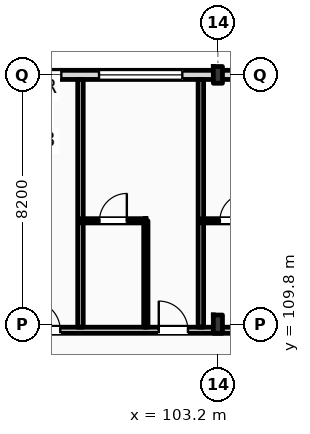
"""IFC4 building model, lengths in metres.
Left out: names, types, materials, properties, quantities, classifications, styles, units other than length and angle.
Written with IfcOpenShell. Run it as: python <this file> out.ifc"""

import sys

from ifc_helpers import new_model, si_unit, direction, frame, frame_2d, origin, origin_2d, place, context, subcontext, project, spatial, rectangle, i_section, extrude, element, fill, save


model = new_model("IFC4")
c1 = context("Model", 3, precision=1e-05, world=origin(), true_north=direction((0.0, 1.0)))
c2 = subcontext(c1, "Body", "Model", "MODEL_VIEW")
j1 = project(units=[si_unit("LENGTHUNIT", "METRE"), si_unit("PLANEANGLEUNIT", "RADIAN")], contexts=[c1])
p1 = place(None, origin())
s1 = spatial("IfcSite", under=j1, at=p1, CompositionType="ELEMENT")
p2 = place(p1, origin())
s2 = spatial("IfcBuilding", under=s1, at=p2, CompositionType="ELEMENT")
p3 = place(p2, frame((0.0, 0.0, 20.4)))
s3 = spatial("IfcBuildingStorey", under=s2, at=p3, CompositionType="ELEMENT", Elevation=20.4)
p4 = place(p3, frame((103.2, 109.8, 0.0), z_axis=(0.0, 0.0, 1.0), x_axis=(1.0, 0.0, 0.0)))
e1 = element("IfcColumn", 1, at=p4, inside=s3, PredefinedType="COLUMN", context=c2, shape_type="SweptSolid", body=[
    extrude(i_section(OverallWidth=0.3, OverallDepth=0.6, WebThickness=0.015, FlangeThickness=0.03, FilletRadius=0.027, at=origin_2d()), origin(), (0.0, 0.0, 1.0), 4.2),
])
p5 = place(p3, frame((103.2, 118.0, 0.0), z_axis=(0.0, 0.0, 1.0), x_axis=(1.0, 0.0, 0.0)))
e2 = element("IfcColumn", 2, at=p5, inside=s3, PredefinedType="COLUMN", context=c2, shape_type="SweptSolid", body=[
    extrude(i_section(OverallWidth=0.3, OverallDepth=0.55, WebThickness=0.015, FlangeThickness=0.029, FilletRadius=0.027, at=origin_2d()), origin(), (0.0, 0.0, 1.0), 4.2),
])
p6 = place(p3, frame((22.5, 118.0, 0.0), z_axis=(0.0, 0.0, 1.0), x_axis=(1.0, 0.0, 0.0)))
e3 = element("IfcWall", 3, at=p6, inside=s3, PredefinedType="STANDARD", context=c2, shape_type="SweptSolid", body=[
    extrude(rectangle(XDim=97.5, YDim=0.3, at=frame_2d((48.75, 0.0))), origin(), (0.0, 0.0, 1.0), 3.38),
])
p7 = place(p6, frame((0.91, 0.0, 0.9)))
e4 = element("IfcOpeningElement", 4, at=p7, cuts=e3, PredefinedType="OPENING", context=c2, shape_type="SweptSolid", body=[
    extrude(rectangle(XDim=0.9, YDim=1.8, at=frame_2d((0.45, 0.9))), frame((0.0, 0.16, 0.0), z_axis=(0.0, -1.0, 0.0), x_axis=(1.0, 0.0, 0.0)), (0.0, 0.0, 1.0), 0.32),
])
p8 = place(p6, frame((6.36, 0.0, 0.0)))
e5 = element("IfcOpeningElement", 5, at=p8, cuts=e3, PredefinedType="OPENING", context=c2, shape_type="SweptSolid", body=[
    extrude(rectangle(XDim=1.2, YDim=2.25, at=frame_2d((0.6, 1.125))), frame((0.0, 0.16, 0.0), z_axis=(0.0, -1.0, 0.0), x_axis=(1.0, 0.0, 0.0)), (0.0, 0.0, 1.0), 0.32),
])
p9 = place(p6, frame((11.41, 0.0, 0.9)))
e6 = element("IfcOpeningElement", 6, at=p9, cuts=e3, PredefinedType="OPENING", context=c2, shape_type="SweptSolid", body=[
    extrude(rectangle(XDim=1.1, YDim=1.9, at=frame_2d((0.55, 0.95))), frame((0.0, 0.16, 0.0), z_axis=(0.0, -1.0, 0.0), x_axis=(1.0, 0.0, 0.0)), (0.0, 0.0, 1.0), 0.32),
])
p10 = place(p6, frame((14.335, 0.0, 0.9)))
e7 = element("IfcOpeningElement", 7, at=p10, cuts=e3, PredefinedType="OPENING", context=c2, shape_type="SweptSolid", body=[
    extrude(rectangle(XDim=1.65, YDim=1.95, at=frame_2d((0.825, 0.975))), frame((0.0, 0.16, 0.0), z_axis=(0.0, -1.0, 0.0), x_axis=(1.0, 0.0, 0.0)), (0.0, 0.0, 1.0), 0.32),
])
p11 = place(p6, frame((19.26, 0.0, 0.9)))
e8 = element("IfcOpeningElement", 8, at=p11, cuts=e3, PredefinedType="OPENING", context=c2, shape_type="SweptSolid", body=[
    extrude(rectangle(XDim=1.35, YDim=2.0, at=frame_2d((0.675, 1.0))), frame((0.0, 0.16, 0.0), z_axis=(0.0, -1.0, 0.0), x_axis=(1.0, 0.0, 0.0)), (0.0, 0.0, 1.0), 0.32),
])
p12 = place(p6, frame((22.8, 0.0, 0.0)))
e9 = element("IfcOpeningElement", 9, at=p12, cuts=e3, PredefinedType="OPENING", context=c2, shape_type="SweptSolid", body=[
    extrude(rectangle(XDim=1.2, YDim=2.25, at=frame_2d((0.6, 1.125))), frame((0.0, 0.16, 0.0), z_axis=(0.0, -1.0, 0.0), x_axis=(1.0, 0.0, 0.0)), (0.0, 0.0, 1.0), 0.32),
])
p13 = place(p6, frame((26.91, 0.0, 0.9)))
e10 = element("IfcOpeningElement", 10, at=p13, cuts=e3, PredefinedType="OPENING", context=c2, shape_type="SweptSolid", body=[
    extrude(rectangle(XDim=2.1, YDim=2.1, at=frame_2d((1.05, 1.05))), frame((0.0, 0.16, 0.0), z_axis=(0.0, -1.0, 0.0), x_axis=(1.0, 0.0, 0.0)), (0.0, 0.0, 1.0), 0.32),
])
p14 = place(p6, frame((30.835, 0.0, 0.9)))
e11 = element("IfcOpeningElement", 11, at=p14, cuts=e3, PredefinedType="OPENING", context=c2, shape_type="SweptSolid", body=[
    extrude(rectangle(XDim=2.25, YDim=2.15, at=frame_2d((1.125, 1.075))), frame((0.0, 0.16, 0.0), z_axis=(0.0, -1.0, 0.0), x_axis=(1.0, 0.0, 0.0)), (0.0, 0.0, 1.0), 0.32),
])
p15 = place(p6, frame((34.96, 0.0, 0.9)))
e12 = element("IfcOpeningElement", 12, at=p15, cuts=e3, PredefinedType="OPENING", context=c2, shape_type="SweptSolid", body=[
    extrude(rectangle(XDim=2.4, YDim=2.2, at=frame_2d((1.2, 1.1))), frame((0.0, 0.16, 0.0), z_axis=(0.0, -1.0, 0.0), x_axis=(1.0, 0.0, 0.0)), (0.0, 0.0, 1.0), 0.32),
])
p16 = place(p6, frame((39.0, 0.0, 0.0)))
e13 = element("IfcOpeningElement", 13, at=p16, cuts=e3, PredefinedType="OPENING", context=c2, shape_type="SweptSolid", body=[
    extrude(rectangle(XDim=1.2, YDim=2.25, at=frame_2d((0.6, 1.125))), frame((0.0, 0.16, 0.0), z_axis=(0.0, -1.0, 0.0), x_axis=(1.0, 0.0, 0.0)), (0.0, 0.0, 1.0), 0.32),
])
p17 = place(p6, frame((43.21, 0.0, 0.9)))
e14 = element("IfcOpeningElement", 14, at=p17, cuts=e3, PredefinedType="OPENING", context=c2, shape_type="SweptSolid", body=[
    extrude(rectangle(XDim=2.7, YDim=2.3, at=frame_2d((1.35, 1.15))), frame((0.0, 0.16, 0.0), z_axis=(0.0, -1.0, 0.0), x_axis=(1.0, 0.0, 0.0)), (0.0, 0.0, 1.0), 0.32),
])
p18 = place(p6, frame((47.335, 0.0, 0.9)))
e15 = element("IfcOpeningElement", 15, at=p18, cuts=e3, PredefinedType="OPENING", context=c2, shape_type="SweptSolid", body=[
    extrude(rectangle(XDim=1.35, YDim=2.3, at=frame_2d((0.675, 1.15))), frame((0.0, 0.16, 0.0), z_axis=(0.0, -1.0, 0.0), x_axis=(1.0, 0.0, 0.0)), (0.0, 0.0, 1.0), 0.32),
])
p19 = place(p6, frame((52.74, 0.0, 0.0)))
e16 = element("IfcOpeningElement", 16, at=p19, cuts=e3, PredefinedType="OPENING", context=c2, shape_type="SweptSolid", body=[
    extrude(rectangle(XDim=1.2, YDim=2.25, at=frame_2d((0.6, 1.125))), frame((0.0, 0.16, 0.0), z_axis=(0.0, -1.0, 0.0), x_axis=(1.0, 0.0, 0.0)), (0.0, 0.0, 1.0), 0.32),
])
p20 = place(p6, frame((55.36, 0.0, 0.9)))
e17 = element("IfcOpeningElement", 17, at=p20, cuts=e3, PredefinedType="OPENING", context=c2, shape_type="SweptSolid", body=[
    extrude(rectangle(XDim=1.1, YDim=2.3, at=frame_2d((0.55, 1.15))), frame((0.0, 0.16, 0.0), z_axis=(0.0, -1.0, 0.0), x_axis=(1.0, 0.0, 0.0)), (0.0, 0.0, 1.0), 0.32),
])
p21 = place(p6, frame((59.99, 0.0, 0.9)))
e18 = element("IfcOpeningElement", 18, at=p21, cuts=e3, PredefinedType="OPENING", context=c2, shape_type="SweptSolid", body=[
    extrude(rectangle(XDim=2.74, YDim=2.3, at=frame_2d((1.37, 1.15))), frame((0.0, 0.16, 0.0), z_axis=(0.0, -1.0, 0.0), x_axis=(1.0, 0.0, 0.0)), (0.0, 0.0, 1.0), 0.32),
])
p22 = place(p6, frame((65.95, 0.0, 0.9)))
e19 = element("IfcOpeningElement", 19, at=p22, cuts=e3, PredefinedType="OPENING", context=c2, shape_type="SweptSolid", body=[
    extrude(rectangle(XDim=1.35, YDim=2.3, at=frame_2d((0.675, 1.15))), frame((0.0, 0.16, 0.0), z_axis=(0.0, -1.0, 0.0), x_axis=(1.0, 0.0, 0.0)), (0.0, 0.0, 1.0), 0.32),
])
p23 = place(p6, frame((69.16, 0.0, 0.0)))
e20 = element("IfcOpeningElement", 20, at=p23, cuts=e3, PredefinedType="OPENING", context=c2, shape_type="SweptSolid", body=[
    extrude(rectangle(XDim=1.2, YDim=2.25, at=frame_2d((0.6, 1.125))), frame((0.0, 0.16, 0.0), z_axis=(0.0, -1.0, 0.0), x_axis=(1.0, 0.0, 0.0)), (0.0, 0.0, 1.0), 0.32),
])
p24 = place(p6, frame((73.75, 0.0, 0.9)))
e21 = element("IfcOpeningElement", 21, at=p24, cuts=e3, PredefinedType="OPENING", context=c2, shape_type="SweptSolid", body=[
    extrude(rectangle(XDim=1.8, YDim=2.3, at=frame_2d((0.9, 1.15))), frame((0.0, 0.16, 0.0), z_axis=(0.0, -1.0, 0.0), x_axis=(1.0, 0.0, 0.0)), (0.0, 0.0, 1.0), 0.32),
])
p25 = place(p6, frame((76.79, 0.0, 0.9)))
e22 = element("IfcOpeningElement", 22, at=p25, cuts=e3, PredefinedType="OPENING", context=c2, shape_type="SweptSolid", body=[
    extrude(rectangle(XDim=2.74, YDim=2.3, at=frame_2d((1.37, 1.15))), frame((0.0, 0.16, 0.0), z_axis=(0.0, -1.0, 0.0), x_axis=(1.0, 0.0, 0.0)), (0.0, 0.0, 1.0), 0.32),
])
p26 = place(p6, frame((81.55, 0.0, 0.9)))
e23 = element("IfcOpeningElement", 23, at=p26, cuts=e3, PredefinedType="OPENING", context=c2, shape_type="SweptSolid", body=[
    extrude(rectangle(XDim=1.8, YDim=2.3, at=frame_2d((0.9, 1.15))), frame((0.0, 0.16, 0.0), z_axis=(0.0, -1.0, 0.0), x_axis=(1.0, 0.0, 0.0)), (0.0, 0.0, 1.0), 0.32),
])
p27 = place(p6, frame((86.01, 0.0, 0.9)))
e24 = element("IfcOpeningElement", 24, at=p27, cuts=e3, PredefinedType="OPENING", context=c2, shape_type="SweptSolid", body=[
    extrude(rectangle(XDim=1.1, YDim=1.5, at=frame_2d((0.55, 0.75))), frame((0.0, 0.16, 0.0), z_axis=(0.0, -1.0, 0.0), x_axis=(1.0, 0.0, 0.0)), (0.0, 0.0, 1.0), 0.32),
])
p28 = place(p6, frame((90.135, 0.0, 0.9)))
e25 = element("IfcOpeningElement", 25, at=p28, cuts=e3, PredefinedType="OPENING", context=c2, shape_type="SweptSolid", body=[
    extrude(rectangle(XDim=1.25, YDim=1.6, at=frame_2d((0.625, 0.8))), frame((0.0, 0.16, 0.0), z_axis=(0.0, -1.0, 0.0), x_axis=(1.0, 0.0, 0.0)), (0.0, 0.0, 1.0), 0.32),
])
p29 = place(p6, frame((94.34, 0.0, 0.9)))
e26 = element("IfcOpeningElement", 26, at=p29, cuts=e3, PredefinedType="OPENING", context=c2, shape_type="SweptSolid", body=[
    extrude(rectangle(XDim=1.4, YDim=1.7, at=frame_2d((0.7, 0.85))), frame((0.0, 0.16, 0.0), z_axis=(0.0, -1.0, 0.0), x_axis=(1.0, 0.0, 0.0)), (0.0, 0.0, 1.0), 0.32),
])
p30 = place(p3, frame((10.65, 109.6, 0.0), z_axis=(0.0, 0.0, 1.0), x_axis=(1.0, 0.0, 0.0)))
e27 = element("IfcWall", 27, at=p30, inside=s3, PredefinedType="PARTITIONING", context=c2, shape_type="SweptSolid", body=[
    extrude(rectangle(XDim=109.21, YDim=0.2, at=frame_2d((54.605, 0.0))), origin(), (0.0, 0.0, 1.0), 3.38),
])
p31 = place(p30, frame((12.535, 0.0, 0.0)))
e28 = element("IfcOpeningElement", 28, at=p31, cuts=e27, PredefinedType="OPENING", context=c2, shape_type="SweptSolid", body=[
    extrude(rectangle(XDim=1.02, YDim=2.2, at=frame_2d((0.51, 1.1))), frame((0.0, 0.11, 0.0), z_axis=(0.0, -1.0, 0.0), x_axis=(1.0, 0.0, 0.0)), (0.0, 0.0, 1.0), 0.22),
])
p32 = place(p30, frame((19.175, 0.0, 0.0)))
e29 = element("IfcOpeningElement", 29, at=p32, cuts=e27, PredefinedType="OPENING", context=c2, shape_type="SweptSolid", body=[
    extrude(rectangle(XDim=1.02, YDim=2.2, at=frame_2d((0.51, 1.1))), frame((0.0, 0.11, 0.0), z_axis=(0.0, -1.0, 0.0), x_axis=(1.0, 0.0, 0.0)), (0.0, 0.0, 1.0), 0.22),
])
p33 = place(p30, frame((23.375, 0.0, 0.0)))
e30 = element("IfcOpeningElement", 30, at=p33, cuts=e27, PredefinedType="OPENING", context=c2, shape_type="SweptSolid", body=[
    extrude(rectangle(XDim=1.02, YDim=2.2, at=frame_2d((0.51, 1.1))), frame((0.0, 0.11, 0.0), z_axis=(0.0, -1.0, 0.0), x_axis=(1.0, 0.0, 0.0)), (0.0, 0.0, 1.0), 0.22),
])
p34 = place(p30, frame((27.575, 0.0, 0.0)))
e31 = element("IfcOpeningElement", 31, at=p34, cuts=e27, PredefinedType="OPENING", context=c2, shape_type="SweptSolid", body=[
    extrude(rectangle(XDim=1.02, YDim=2.2, at=frame_2d((0.51, 1.1))), frame((0.0, 0.11, 0.0), z_axis=(0.0, -1.0, 0.0), x_axis=(1.0, 0.0, 0.0)), (0.0, 0.0, 1.0), 0.22),
])
p35 = place(p30, frame((31.805, 0.0, 0.0)))
e32 = element("IfcOpeningElement", 32, at=p35, cuts=e27, PredefinedType="OPENING", context=c2, shape_type="SweptSolid", body=[
    extrude(rectangle(XDim=0.96, YDim=2.2, at=frame_2d((0.48, 1.1))), frame((0.0, 0.11, 0.0), z_axis=(0.0, -1.0, 0.0), x_axis=(1.0, 0.0, 0.0)), (0.0, 0.0, 1.0), 0.22),
])
p36 = place(p30, frame((33.855, 0.0, 0.0)))
e33 = element("IfcOpeningElement", 33, at=p36, cuts=e27, PredefinedType="OPENING", context=c2, shape_type="SweptSolid", body=[
    extrude(rectangle(XDim=0.96, YDim=2.2, at=frame_2d((0.48, 1.1))), frame((0.0, 0.11, 0.0), z_axis=(0.0, -1.0, 0.0), x_axis=(1.0, 0.0, 0.0)), (0.0, 0.0, 1.0), 0.22),
])
p37 = place(p30, frame((40.205, 0.0, 0.0)))
e34 = element("IfcOpeningElement", 34, at=p37, cuts=e27, PredefinedType="OPENING", context=c2, shape_type="SweptSolid", body=[
    extrude(rectangle(XDim=0.96, YDim=2.2, at=frame_2d((0.48, 1.1))), frame((0.0, 0.11, 0.0), z_axis=(0.0, -1.0, 0.0), x_axis=(1.0, 0.0, 0.0)), (0.0, 0.0, 1.0), 0.22),
])
p38 = place(p30, frame((42.255, 0.0, 0.0)))
e35 = element("IfcOpeningElement", 35, at=p38, cuts=e27, PredefinedType="OPENING", context=c2, shape_type="SweptSolid", body=[
    extrude(rectangle(XDim=0.96, YDim=2.2, at=frame_2d((0.48, 1.1))), frame((0.0, 0.11, 0.0), z_axis=(0.0, -1.0, 0.0), x_axis=(1.0, 0.0, 0.0)), (0.0, 0.0, 1.0), 0.22),
])
p39 = place(p30, frame((48.605, 0.0, 0.0)))
e36 = element("IfcOpeningElement", 36, at=p39, cuts=e27, PredefinedType="OPENING", context=c2, shape_type="SweptSolid", body=[
    extrude(rectangle(XDim=0.96, YDim=2.2, at=frame_2d((0.48, 1.1))), frame((0.0, 0.11, 0.0), z_axis=(0.0, -1.0, 0.0), x_axis=(1.0, 0.0, 0.0)), (0.0, 0.0, 1.0), 0.22),
])
p40 = place(p30, frame((50.655, 0.0, 0.0)))
e37 = element("IfcOpeningElement", 37, at=p40, cuts=e27, PredefinedType="OPENING", context=c2, shape_type="SweptSolid", body=[
    extrude(rectangle(XDim=0.96, YDim=2.2, at=frame_2d((0.48, 1.1))), frame((0.0, 0.11, 0.0), z_axis=(0.0, -1.0, 0.0), x_axis=(1.0, 0.0, 0.0)), (0.0, 0.0, 1.0), 0.22),
])
p41 = place(p30, frame((57.005, 0.0, 0.0)))
e38 = element("IfcOpeningElement", 38, at=p41, cuts=e27, PredefinedType="OPENING", context=c2, shape_type="SweptSolid", body=[
    extrude(rectangle(XDim=0.96, YDim=2.2, at=frame_2d((0.48, 1.1))), frame((0.0, 0.11, 0.0), z_axis=(0.0, -1.0, 0.0), x_axis=(1.0, 0.0, 0.0)), (0.0, 0.0, 1.0), 0.22),
])
p42 = place(p30, frame((59.055, 0.0, 0.0)))
e39 = element("IfcOpeningElement", 39, at=p42, cuts=e27, PredefinedType="OPENING", context=c2, shape_type="SweptSolid", body=[
    extrude(rectangle(XDim=0.96, YDim=2.2, at=frame_2d((0.48, 1.1))), frame((0.0, 0.11, 0.0), z_axis=(0.0, -1.0, 0.0), x_axis=(1.0, 0.0, 0.0)), (0.0, 0.0, 1.0), 0.22),
])
p43 = place(p30, frame((65.405, 0.0, 0.0)))
e40 = element("IfcOpeningElement", 40, at=p43, cuts=e27, PredefinedType="OPENING", context=c2, shape_type="SweptSolid", body=[
    extrude(rectangle(XDim=0.96, YDim=2.2, at=frame_2d((0.48, 1.1))), frame((0.0, 0.11, 0.0), z_axis=(0.0, -1.0, 0.0), x_axis=(1.0, 0.0, 0.0)), (0.0, 0.0, 1.0), 0.22),
])
p44 = place(p30, frame((67.205, 0.0, 0.0)))
e41 = element("IfcOpeningElement", 41, at=p44, cuts=e27, PredefinedType="OPENING", context=c2, shape_type="SweptSolid", body=[
    extrude(rectangle(XDim=0.96, YDim=2.2, at=frame_2d((0.48, 1.1))), frame((0.0, 0.11, 0.0), z_axis=(0.0, -1.0, 0.0), x_axis=(1.0, 0.0, 0.0)), (0.0, 0.0, 1.0), 0.22),
])
p45 = place(p30, frame((73.805, 0.0, 0.0)))
e42 = element("IfcOpeningElement", 42, at=p45, cuts=e27, PredefinedType="OPENING", context=c2, shape_type="SweptSolid", body=[
    extrude(rectangle(XDim=0.96, YDim=2.2, at=frame_2d((0.48, 1.1))), frame((0.0, 0.11, 0.0), z_axis=(0.0, -1.0, 0.0), x_axis=(1.0, 0.0, 0.0)), (0.0, 0.0, 1.0), 0.22),
])
p46 = place(p30, frame((78.255, 0.0, 0.0)))
e43 = element("IfcOpeningElement", 43, at=p46, cuts=e27, PredefinedType="OPENING", context=c2, shape_type="SweptSolid", body=[
    extrude(rectangle(XDim=0.96, YDim=2.2, at=frame_2d((0.48, 1.1))), frame((0.0, 0.11, 0.0), z_axis=(0.0, -1.0, 0.0), x_axis=(1.0, 0.0, 0.0)), (0.0, 0.0, 1.0), 0.22),
])
p47 = place(p30, frame((82.205, 0.0, 0.0)))
e44 = element("IfcOpeningElement", 44, at=p47, cuts=e27, PredefinedType="OPENING", context=c2, shape_type="SweptSolid", body=[
    extrude(rectangle(XDim=0.96, YDim=2.2, at=frame_2d((0.48, 1.1))), frame((0.0, 0.11, 0.0), z_axis=(0.0, -1.0, 0.0), x_axis=(1.0, 0.0, 0.0)), (0.0, 0.0, 1.0), 0.22),
])
p48 = place(p30, frame((86.405, 0.0, 0.0)))
e45 = element("IfcOpeningElement", 45, at=p48, cuts=e27, PredefinedType="OPENING", context=c2, shape_type="SweptSolid", body=[
    extrude(rectangle(XDim=0.96, YDim=2.2, at=frame_2d((0.48, 1.1))), frame((0.0, 0.11, 0.0), z_axis=(0.0, -1.0, 0.0), x_axis=(1.0, 0.0, 0.0)), (0.0, 0.0, 1.0), 0.22),
])
p49 = place(p30, frame((90.605, 0.0, 0.0)))
e46 = element("IfcOpeningElement", 46, at=p49, cuts=e27, PredefinedType="OPENING", context=c2, shape_type="SweptSolid", body=[
    extrude(rectangle(XDim=0.96, YDim=2.2, at=frame_2d((0.48, 1.1))), frame((0.0, 0.11, 0.0), z_axis=(0.0, -1.0, 0.0), x_axis=(1.0, 0.0, 0.0)), (0.0, 0.0, 1.0), 0.22),
])
p50 = place(p30, frame((94.805, 0.0, 0.0)))
e47 = element("IfcOpeningElement", 47, at=p50, cuts=e27, PredefinedType="OPENING", context=c2, shape_type="SweptSolid", body=[
    extrude(rectangle(XDim=0.96, YDim=2.2, at=frame_2d((0.48, 1.1))), frame((0.0, 0.11, 0.0), z_axis=(0.0, -1.0, 0.0), x_axis=(1.0, 0.0, 0.0)), (0.0, 0.0, 1.0), 0.22),
])
p51 = place(p30, frame((99.005, 0.0, 0.0)))
e48 = element("IfcOpeningElement", 48, at=p51, cuts=e27, PredefinedType="OPENING", context=c2, shape_type="SweptSolid", body=[
    extrude(rectangle(XDim=0.96, YDim=2.2, at=frame_2d((0.48, 1.1))), frame((0.0, 0.11, 0.0), z_axis=(0.0, -1.0, 0.0), x_axis=(1.0, 0.0, 0.0)), (0.0, 0.0, 1.0), 0.22),
])
p52 = place(p30, frame((103.205, 0.0, 0.0)))
e49 = element("IfcOpeningElement", 49, at=p52, cuts=e27, PredefinedType="OPENING", context=c2, shape_type="SweptSolid", body=[
    extrude(rectangle(XDim=0.96, YDim=2.2, at=frame_2d((0.48, 1.1))), frame((0.0, 0.11, 0.0), z_axis=(0.0, -1.0, 0.0), x_axis=(1.0, 0.0, 0.0)), (0.0, 0.0, 1.0), 0.22),
])
p53 = place(p30, frame((105.335, 0.0, 0.0)))
e50 = element("IfcOpeningElement", 50, at=p53, cuts=e27, PredefinedType="OPENING", context=c2, shape_type="SweptSolid", body=[
    extrude(rectangle(XDim=0.96, YDim=2.2, at=frame_2d((0.48, 1.1))), frame((0.0, 0.11, 0.0), z_axis=(0.0, -1.0, 0.0), x_axis=(1.0, 0.0, 0.0)), (0.0, 0.0, 1.0), 0.22),
])
p54 = place(p30, frame((2.716, 0.0, 0.0)))
e51 = element("IfcOpeningElement", 51, at=p54, cuts=e27, PredefinedType="OPENING", context=c2, shape_type="SweptSolid", body=[
    extrude(rectangle(XDim=1.35, YDim=2.25, at=frame_2d((0.675, 1.125))), frame((0.0, 0.11, 0.0), z_axis=(0.0, -1.0, 0.0), x_axis=(1.0, 0.0, 0.0)), (0.0, 0.0, 1.0), 0.22),
])
p55 = place(p30, frame((6.65, 0.0, 0.0)))
e52 = element("IfcOpeningElement", 52, at=p55, cuts=e27, PredefinedType="OPENING", context=c2, shape_type="SweptSolid", body=[
    extrude(rectangle(XDim=1.35, YDim=2.25, at=frame_2d((0.675, 1.125))), frame((0.0, 0.11, 0.0), z_axis=(0.0, -1.0, 0.0), x_axis=(1.0, 0.0, 0.0)), (0.0, 0.0, 1.0), 0.22),
])
p56 = place(p30, frame((10.583, 0.0, 0.0)))
e53 = element("IfcOpeningElement", 53, at=p56, cuts=e27, PredefinedType="OPENING", context=c2, shape_type="SweptSolid", body=[
    extrude(rectangle(XDim=1.35, YDim=2.25, at=frame_2d((0.675, 1.125))), frame((0.0, 0.11, 0.0), z_axis=(0.0, -1.0, 0.0), x_axis=(1.0, 0.0, 0.0)), (0.0, 0.0, 1.0), 0.22),
])
for number, where, z_axis, x_axis in (
    (54, (98.68, 109.7, 0.0), (0.0, 0.0, 1.0), (0.0, 1.0, 0.0)),
    (55, (102.64, 109.7, 0.0), (0.0, 0.0, 1.0), (0.0, 1.0, 0.0)),
):
    element("IfcWall", number, at=place(p3, frame(where, z_axis=z_axis, x_axis=x_axis)), inside=s3, PredefinedType="PARTITIONING", context=c2, shape_type="SweptSolid", body=[
        extrude(rectangle(XDim=8.15, YDim=0.18, at=frame_2d((4.075, 0.0))), origin(), (0.0, 0.0, 1.0), 3.94),
    ])
p57 = place(p3, frame((100.83, 109.7, 0.0), z_axis=(0.0, 0.0, 1.0), x_axis=(0.0, 1.0, 0.0)))
e56 = element("IfcWall", 56, at=p57, inside=s3, PredefinedType="PARTITIONING", context=c2, shape_type="SweptSolid", body=[
    extrude(rectangle(XDim=3.5, YDim=0.14, at=frame_2d((1.75, 0.0))), origin(), (0.0, 0.0, 1.0), 3.94),
])
p58 = place(p3, frame((98.68, 113.2, 0.0), z_axis=(0.0, 0.0, 1.0), x_axis=(1.0, 0.0, 0.0)))
e57 = element("IfcWall", 57, at=p58, inside=s3, PredefinedType="PARTITIONING", context=c2, shape_type="SweptSolid", body=[
    extrude(rectangle(XDim=2.15, YDim=0.14, at=frame_2d((1.075, 0.0))), origin(), (0.0, 0.0, 1.0), 3.94),
])
p59 = place(p58, frame((0.625, 0.0, 0.0)))
e58 = element("IfcOpeningElement", 58, at=p59, cuts=e57, PredefinedType="OPENING", context=c2, shape_type="SweptSolid", body=[
    extrude(rectangle(XDim=0.9, YDim=2.1, at=frame_2d((0.45, 1.05))), frame((0.0, 0.08, 0.0), z_axis=(0.0, -1.0, 0.0), x_axis=(1.0, 0.0, 0.0)), (0.0, 0.0, 1.0), 0.16),
])
p60 = place(p3, frame((102.64, 113.2, 0.0), z_axis=(0.0, 0.0, 1.0), x_axis=(1.0, 0.0, 0.0)))
e59 = element("IfcWall", 59, at=p60, inside=s3, PredefinedType="PARTITIONING", context=c2, shape_type="SweptSolid", body=[
    extrude(rectangle(XDim=2.15, YDim=0.14, at=frame_2d((1.075, 0.0))), origin(), (0.0, 0.0, 1.0), 3.94),
])
p61 = place(p60, frame((0.625, 0.0, 0.0)))
e60 = element("IfcOpeningElement", 60, at=p61, cuts=e59, PredefinedType="OPENING", context=c2, shape_type="SweptSolid", body=[
    extrude(rectangle(XDim=0.9, YDim=2.1, at=frame_2d((0.45, 1.05))), frame((0.0, 0.08, 0.0), z_axis=(0.0, -1.0, 0.0), x_axis=(1.0, 0.0, 0.0)), (0.0, 0.0, 1.0), 0.16),
])
p62 = place(p24, origin())
e61 = element("IfcWindow", 61, at=p62, inside=s3, PartitioningType="DOUBLE_PANEL_VERTICAL", PredefinedType="WINDOW", context=c2, shape_type="SweptSolid", body=[
    extrude(rectangle(XDim=1.8, YDim=2.3, at=frame_2d((0.9, 1.15))), frame((0.0, 0.03, 0.0), z_axis=(0.0, -1.0, 0.0), x_axis=(1.0, 0.0, 0.0)), (0.0, 0.0, 1.0), 0.06),
])
fill(e21, e61)
p63 = place(p25, origin())
e62 = element("IfcWindow", 62, at=p63, inside=s3, PartitioningType="DOUBLE_PANEL_VERTICAL", PredefinedType="WINDOW", context=c2, shape_type="SweptSolid", body=[
    extrude(rectangle(XDim=2.74, YDim=2.3, at=frame_2d((1.37, 1.15))), frame((0.0, 0.03, 0.0), z_axis=(0.0, -1.0, 0.0), x_axis=(1.0, 0.0, 0.0)), (0.0, 0.0, 1.0), 0.06),
])
fill(e22, e62)
p64 = place(p48, origin())
e63 = element("IfcDoor", 63, at=p64, inside=s3, OperationType="SINGLE_SWING_LEFT", PredefinedType="DOOR", context=c2, shape_type="SweptSolid", body=[
    extrude(rectangle(XDim=0.96, YDim=2.2, at=frame_2d((0.48, 1.1))), frame((0.0, 0.025, 0.0), z_axis=(0.0, -1.0, 0.0), x_axis=(1.0, 0.0, 0.0)), (0.0, 0.0, 1.0), 0.05),
])
fill(e45, e63)
p65 = place(p49, origin())
e64 = element("IfcDoor", 64, at=p65, inside=s3, OperationType="SINGLE_SWING_LEFT", PredefinedType="DOOR", context=c2, shape_type="SweptSolid", body=[
    extrude(rectangle(XDim=0.96, YDim=2.2, at=frame_2d((0.48, 1.1))), frame((0.0, 0.025, 0.0), z_axis=(0.0, -1.0, 0.0), x_axis=(1.0, 0.0, 0.0)), (0.0, 0.0, 1.0), 0.05),
])
fill(e46, e64)
p66 = place(p59, origin())
e65 = element("IfcDoor", 65, at=p66, inside=s3, OperationType="SINGLE_SWING_RIGHT", PredefinedType="DOOR", context=c2, shape_type="SweptSolid", body=[
    extrude(rectangle(XDim=0.9, YDim=2.1, at=frame_2d((0.45, 1.05))), frame((0.0, 0.025, 0.0), z_axis=(0.0, -1.0, 0.0), x_axis=(1.0, 0.0, 0.0)), (0.0, 0.0, 1.0), 0.05),
])
fill(e58, e65)
p67 = place(p61, origin())
e66 = element("IfcDoor", 66, at=p67, inside=s3, OperationType="SINGLE_SWING_RIGHT", PredefinedType="DOOR", context=c2, shape_type="SweptSolid", body=[
    extrude(rectangle(XDim=0.9, YDim=2.1, at=frame_2d((0.45, 1.05))), frame((0.0, 0.025, 0.0), z_axis=(0.0, -1.0, 0.0), x_axis=(1.0, 0.0, 0.0)), (0.0, 0.0, 1.0), 0.05),
])
fill(e60, e66)
save(model, sys.argv[1])
